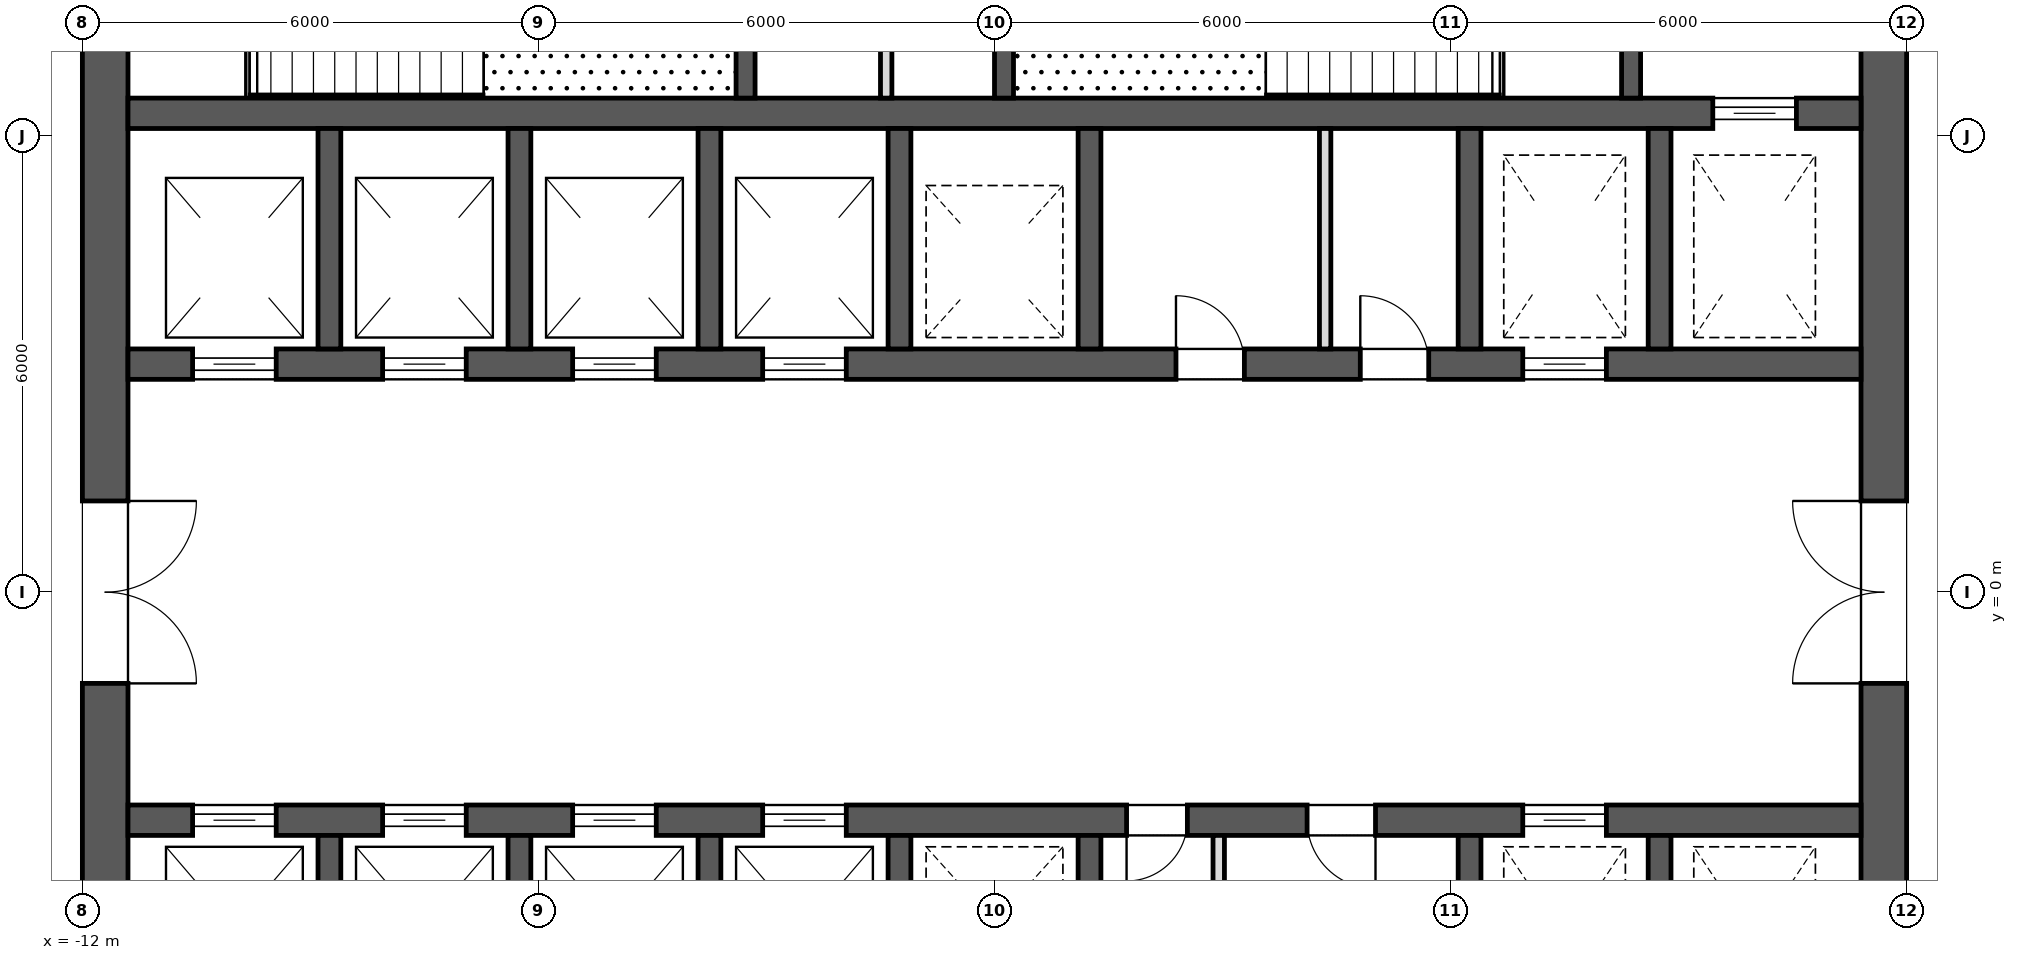
"""IFC4 building model, lengths in metres.
Left out: names, types, materials, properties, quantities, classifications, styles, units other than length and angle.
Written with IfcOpenShell. Run it as: python <this file> out.ifc"""

import sys

from ifc_helpers import new_model, si_unit, direction, frame, frame_2d, origin, place, context, subcontext, project, spatial, rectangle, extrude, element, fill, save


model = new_model("IFC4")
c1 = context("Model", 3, precision=1e-05, world=origin(), true_north=direction((0.0, 1.0)))
c2 = subcontext(c1, "Body", "Model", "MODEL_VIEW")
j1 = project(units=[si_unit("LENGTHUNIT", "METRE"), si_unit("PLANEANGLEUNIT", "RADIAN")], contexts=[c1])
p1 = place(None, origin())
s1 = spatial("IfcSite", under=j1, at=p1, CompositionType="ELEMENT")
p2 = place(p1, origin())
s2 = spatial("IfcBuilding", under=s1, at=p2, CompositionType="ELEMENT")
p3 = place(p2, frame((0.0, 0.0, 202.9)))
s3 = spatial("IfcBuildingStorey", under=s2, at=p3, CompositionType="ELEMENT", Elevation=202.9)
p4 = place(p3, frame((11.7, -11.4, 0.0), z_axis=(0.0, 0.0, 1.0), x_axis=(0.0, 1.0, 0.0)))
e1 = element("IfcWall", 1, at=p4, inside=s3, PredefinedType="SHEAR", context=c2, shape_type="SweptSolid", body=[
    extrude(rectangle(XDim=22.8, YDim=0.6, at=frame_2d((11.4, 0.0))), origin(), (0.0, 0.0, 1.0), 4.0),
])
p5 = place(p4, frame((10.2, 0.0, 0.0)))
e2 = element("IfcOpeningElement", 2, at=p5, cuts=e1, PredefinedType="OPENING", context=c2, shape_type="SweptSolid", body=[
    extrude(rectangle(XDim=2.4, YDim=2.1, at=frame_2d((1.2, 1.05))), frame((0.0, 0.312, 0.0), z_axis=(0.0, -1.0, 0.0), x_axis=(1.0, 0.0, 0.0)), (0.0, 0.0, 1.0), 0.624),
])
p6 = place(p4, frame((19.5, 0.0, 0.0)))
e3 = element("IfcOpeningElement", 3, at=p6, cuts=e1, PredefinedType="OPENING", context=c2, shape_type="SweptSolid", body=[
    extrude(rectangle(XDim=1.2, YDim=2.1, at=frame_2d((0.6, 1.05))), frame((0.0, 0.312, 0.0), z_axis=(0.0, -1.0, 0.0), x_axis=(1.0, 0.0, 0.0)), (0.0, 0.0, 1.0), 0.624),
])
p7 = place(p4, frame((2.1, 0.0, 0.0)))
e4 = element("IfcOpeningElement", 4, at=p7, cuts=e1, PredefinedType="OPENING", context=c2, shape_type="SweptSolid", body=[
    extrude(rectangle(XDim=1.2, YDim=2.1, at=frame_2d((0.6, 1.05))), frame((0.0, 0.312, 0.0), z_axis=(0.0, -1.0, 0.0), x_axis=(1.0, 0.0, 0.0)), (0.0, 0.0, 1.0), 0.624),
])
p8 = place(p3, frame((-11.7, -11.4, 0.0), z_axis=(0.0, 0.0, 1.0), x_axis=(0.0, 1.0, 0.0)))
e5 = element("IfcWall", 5, at=p8, inside=s3, PredefinedType="SHEAR", context=c2, shape_type="SweptSolid", body=[
    extrude(rectangle(XDim=22.8, YDim=0.6, at=frame_2d((11.4, 0.0))), origin(), (0.0, 0.0, 1.0), 4.0),
])
p9 = place(p8, frame((10.2, 0.0, 0.0)))
e6 = element("IfcOpeningElement", 6, at=p9, cuts=e5, PredefinedType="OPENING", context=c2, shape_type="SweptSolid", body=[
    extrude(rectangle(XDim=2.4, YDim=2.1, at=frame_2d((1.2, 1.05))), frame((0.0, 0.312, 0.0), z_axis=(0.0, -1.0, 0.0), x_axis=(1.0, 0.0, 0.0)), (0.0, 0.0, 1.0), 0.624),
])
p10 = place(p8, frame((18.925, 0.0, 0.0)))
e7 = element("IfcOpeningElement", 7, at=p10, cuts=e5, PredefinedType="OPENING", context=c2, shape_type="SweptSolid", body=[
    extrude(rectangle(XDim=1.2, YDim=2.1, at=frame_2d((0.6, 1.05))), frame((0.0, 0.312, 0.0), z_axis=(0.0, -1.0, 0.0), x_axis=(1.0, 0.0, 0.0)), (0.0, 0.0, 1.0), 0.624),
])
p11 = place(p8, frame((2.675, 0.0, 0.0)))
e8 = element("IfcOpeningElement", 8, at=p11, cuts=e5, PredefinedType="OPENING", context=c2, shape_type="SweptSolid", body=[
    extrude(rectangle(XDim=1.2, YDim=2.1, at=frame_2d((0.6, 1.05))), frame((0.0, 0.312, 0.0), z_axis=(0.0, -1.0, 0.0), x_axis=(1.0, 0.0, 0.0)), (0.0, 0.0, 1.0), 0.624),
])
p12 = place(p3, frame((-11.4, 3.0, 0.0), z_axis=(0.0, 0.0, 1.0), x_axis=(1.0, 0.0, 0.0)))
e9 = element("IfcWall", 9, at=p12, inside=s3, PredefinedType="SHEAR", context=c2, shape_type="SweptSolid", body=[
    extrude(rectangle(XDim=22.8, YDim=0.4, at=frame_2d((11.4, 0.0))), origin(), (0.0, 0.0, 1.0), 4.0),
])
p13 = place(p12, frame((0.85, 0.0, 0.0)))
e10 = element("IfcOpeningElement", 10, at=p13, cuts=e9, PredefinedType="OPENING", context=c2, shape_type="SweptSolid", body=[
    extrude(rectangle(XDim=1.1, YDim=2.1, at=frame_2d((0.55, 1.05))), frame((0.0, 0.212, 0.0), z_axis=(0.0, -1.0, 0.0), x_axis=(1.0, 0.0, 0.0)), (0.0, 0.0, 1.0), 0.424),
])
p14 = place(p12, frame((3.35, 0.0, 0.0)))
e11 = element("IfcOpeningElement", 11, at=p14, cuts=e9, PredefinedType="OPENING", context=c2, shape_type="SweptSolid", body=[
    extrude(rectangle(XDim=1.1, YDim=2.1, at=frame_2d((0.55, 1.05))), frame((0.0, 0.212, 0.0), z_axis=(0.0, -1.0, 0.0), x_axis=(1.0, 0.0, 0.0)), (0.0, 0.0, 1.0), 0.424),
])
p15 = place(p12, frame((5.85, 0.0, 0.0)))
e12 = element("IfcOpeningElement", 12, at=p15, cuts=e9, PredefinedType="OPENING", context=c2, shape_type="SweptSolid", body=[
    extrude(rectangle(XDim=1.1, YDim=2.1, at=frame_2d((0.55, 1.05))), frame((0.0, 0.212, 0.0), z_axis=(0.0, -1.0, 0.0), x_axis=(1.0, 0.0, 0.0)), (0.0, 0.0, 1.0), 0.424),
])
p16 = place(p12, frame((8.35, 0.0, 0.0)))
e13 = element("IfcOpeningElement", 13, at=p16, cuts=e9, PredefinedType="OPENING", context=c2, shape_type="SweptSolid", body=[
    extrude(rectangle(XDim=1.1, YDim=2.1, at=frame_2d((0.55, 1.05))), frame((0.0, 0.212, 0.0), z_axis=(0.0, -1.0, 0.0), x_axis=(1.0, 0.0, 0.0)), (0.0, 0.0, 1.0), 0.424),
])
p17 = place(p12, frame((18.35, 0.0, 0.0)))
e14 = element("IfcOpeningElement", 14, at=p17, cuts=e9, PredefinedType="OPENING", context=c2, shape_type="SweptSolid", body=[
    extrude(rectangle(XDim=1.1, YDim=2.1, at=frame_2d((0.55, 1.05))), frame((0.0, 0.212, 0.0), z_axis=(0.0, -1.0, 0.0), x_axis=(1.0, 0.0, 0.0)), (0.0, 0.0, 1.0), 0.424),
])
p18 = place(p12, frame((13.788, 0.0, 0.0)))
e15 = element("IfcOpeningElement", 15, at=p18, cuts=e9, PredefinedType="OPENING", context=c2, shape_type="SweptSolid", body=[
    extrude(rectangle(XDim=0.9, YDim=2.1, at=frame_2d((0.45, 1.05))), frame((0.0, 0.212, 0.0), z_axis=(0.0, -1.0, 0.0), x_axis=(1.0, 0.0, 0.0)), (0.0, 0.0, 1.0), 0.424),
])
p19 = place(p12, frame((16.212, 0.0, 0.0)))
e16 = element("IfcOpeningElement", 16, at=p19, cuts=e9, PredefinedType="OPENING", context=c2, shape_type="SweptSolid", body=[
    extrude(rectangle(XDim=0.9, YDim=2.1, at=frame_2d((0.45, 1.05))), frame((0.0, 0.212, 0.0), z_axis=(0.0, -1.0, 0.0), x_axis=(1.0, 0.0, 0.0)), (0.0, 0.0, 1.0), 0.424),
])
p20 = place(p3, frame((-11.4, 6.3, 0.0), z_axis=(0.0, 0.0, 1.0), x_axis=(1.0, 0.0, 0.0)))
e17 = element("IfcWall", 17, at=p20, inside=s3, PredefinedType="SHEAR", context=c2, shape_type="SweptSolid", body=[
    extrude(rectangle(XDim=22.8, YDim=0.4, at=frame_2d((11.4, 0.0))), origin(), (0.0, 0.0, 1.0), 4.0),
])
p21 = place(p20, frame((20.85, 0.0, 0.0)))
e18 = element("IfcOpeningElement", 18, at=p21, cuts=e17, PredefinedType="OPENING", context=c2, shape_type="SweptSolid", body=[
    extrude(rectangle(XDim=1.1, YDim=2.1, at=frame_2d((0.55, 1.05))), frame((0.0, 0.212, 0.0), z_axis=(0.0, -1.0, 0.0), x_axis=(1.0, 0.0, 0.0)), (0.0, 0.0, 1.0), 0.424),
])
for number, where, z_axis, x_axis in (
    (19, (-8.75, 3.2, 0.0), (0.0, 0.0, 1.0), (0.0, 1.0, 0.0)),
    (20, (-6.25, 3.2, 0.0), (0.0, 0.0, 1.0), (0.0, 1.0, 0.0)),
    (21, (-3.75, 3.2, 0.0), (0.0, 0.0, 1.0), (0.0, 1.0, 0.0)),
    (22, (-1.25, 3.2, 0.0), (0.0, 0.0, 1.0), (0.0, 1.0, 0.0)),
    (23, (1.25, 3.2, 0.0), (0.0, 0.0, 1.0), (0.0, 1.0, 0.0)),
    (24, (6.25, 3.2, 0.0), (0.0, 0.0, 1.0), (0.0, 1.0, 0.0)),
    (25, (8.75, 3.2, 0.0), (0.0, 0.0, 1.0), (0.0, 1.0, 0.0)),
):
    element("IfcWall", number, at=place(p3, frame(where, z_axis=z_axis, x_axis=x_axis)), inside=s3, PredefinedType="SHEAR", context=c2, shape_type="SweptSolid", body=[
        extrude(rectangle(XDim=2.9, YDim=0.3, at=frame_2d((1.45, 0.0))), origin(), (0.0, 0.0, 1.0), 4.0),
    ])
p22 = place(p3, frame((-11.4, -3.0, 0.0), z_axis=(0.0, 0.0, 1.0), x_axis=(1.0, 0.0, 0.0)))
e26 = element("IfcWall", 26, at=p22, inside=s3, PredefinedType="SHEAR", context=c2, shape_type="SweptSolid", body=[
    extrude(rectangle(XDim=22.8, YDim=0.4, at=frame_2d((11.4, 0.0))), origin(), (0.0, 0.0, 1.0), 4.0),
])
p23 = place(p22, frame((0.85, 0.0, 0.0)))
e27 = element("IfcOpeningElement", 27, at=p23, cuts=e26, PredefinedType="OPENING", context=c2, shape_type="SweptSolid", body=[
    extrude(rectangle(XDim=1.1, YDim=2.1, at=frame_2d((0.55, 1.05))), frame((0.0, 0.212, 0.0), z_axis=(0.0, -1.0, 0.0), x_axis=(1.0, 0.0, 0.0)), (0.0, 0.0, 1.0), 0.424),
])
p24 = place(p22, frame((3.35, 0.0, 0.0)))
e28 = element("IfcOpeningElement", 28, at=p24, cuts=e26, PredefinedType="OPENING", context=c2, shape_type="SweptSolid", body=[
    extrude(rectangle(XDim=1.1, YDim=2.1, at=frame_2d((0.55, 1.05))), frame((0.0, 0.212, 0.0), z_axis=(0.0, -1.0, 0.0), x_axis=(1.0, 0.0, 0.0)), (0.0, 0.0, 1.0), 0.424),
])
p25 = place(p22, frame((5.85, 0.0, 0.0)))
e29 = element("IfcOpeningElement", 29, at=p25, cuts=e26, PredefinedType="OPENING", context=c2, shape_type="SweptSolid", body=[
    extrude(rectangle(XDim=1.1, YDim=2.1, at=frame_2d((0.55, 1.05))), frame((0.0, 0.212, 0.0), z_axis=(0.0, -1.0, 0.0), x_axis=(1.0, 0.0, 0.0)), (0.0, 0.0, 1.0), 0.424),
])
p26 = place(p22, frame((8.35, 0.0, 0.0)))
e30 = element("IfcOpeningElement", 30, at=p26, cuts=e26, PredefinedType="OPENING", context=c2, shape_type="SweptSolid", body=[
    extrude(rectangle(XDim=1.1, YDim=2.1, at=frame_2d((0.55, 1.05))), frame((0.0, 0.212, 0.0), z_axis=(0.0, -1.0, 0.0), x_axis=(1.0, 0.0, 0.0)), (0.0, 0.0, 1.0), 0.424),
])
p27 = place(p22, frame((18.35, 0.0, 0.0)))
e31 = element("IfcOpeningElement", 31, at=p27, cuts=e26, PredefinedType="OPENING", context=c2, shape_type="SweptSolid", body=[
    extrude(rectangle(XDim=1.1, YDim=2.1, at=frame_2d((0.55, 1.05))), frame((0.0, 0.212, 0.0), z_axis=(0.0, -1.0, 0.0), x_axis=(1.0, 0.0, 0.0)), (0.0, 0.0, 1.0), 0.424),
])
p28 = place(p22, frame((13.137, 0.0, 0.0)))
e32 = element("IfcOpeningElement", 32, at=p28, cuts=e26, PredefinedType="OPENING", context=c2, shape_type="SweptSolid", body=[
    extrude(rectangle(XDim=0.8, YDim=2.1, at=frame_2d((0.4, 1.05))), frame((0.0, 0.212, 0.0), z_axis=(0.0, -1.0, 0.0), x_axis=(1.0, 0.0, 0.0)), (0.0, 0.0, 1.0), 0.424),
])
p29 = place(p22, frame((15.512, 0.0, 0.0)))
e33 = element("IfcOpeningElement", 33, at=p29, cuts=e26, PredefinedType="OPENING", context=c2, shape_type="SweptSolid", body=[
    extrude(rectangle(XDim=0.9, YDim=2.1, at=frame_2d((0.45, 1.05))), frame((0.0, 0.212, 0.0), z_axis=(0.0, -1.0, 0.0), x_axis=(1.0, 0.0, 0.0)), (0.0, 0.0, 1.0), 0.424),
])
for number, where, z_axis, x_axis in (
    (34, (-8.75, -6.1, 0.0), (0.0, 0.0, 1.0), (0.0, 1.0, 0.0)),
    (35, (-6.25, -6.1, 0.0), (0.0, 0.0, 1.0), (0.0, 1.0, 0.0)),
    (36, (-3.75, -6.1, 0.0), (0.0, 0.0, 1.0), (0.0, 1.0, 0.0)),
    (37, (-1.25, -6.1, 0.0), (0.0, 0.0, 1.0), (0.0, 1.0, 0.0)),
    (38, (1.25, -6.1, 0.0), (0.0, 0.0, 1.0), (0.0, 1.0, 0.0)),
    (39, (6.25, -6.1, 0.0), (0.0, 0.0, 1.0), (0.0, 1.0, 0.0)),
    (40, (8.75, -6.1, 0.0), (0.0, 0.0, 1.0), (0.0, 1.0, 0.0)),
):
    element("IfcWall", number, at=place(p3, frame(where, z_axis=z_axis, x_axis=x_axis)), inside=s3, PredefinedType="SHEAR", context=c2, shape_type="SweptSolid", body=[
        extrude(rectangle(XDim=2.9, YDim=0.3, at=frame_2d((1.45, 0.0))), origin(), (0.0, 0.0, 1.0), 4.0),
    ])
for number, where, z_axis, x_axis in (
    (41, (-3.275, 6.5, 0.0), (0.0, 0.0, 1.0), (0.0, 1.0, 0.0)),
    (42, (0.125, 6.5, 0.0), (0.0, 0.0, 1.0), (0.0, 1.0, 0.0)),
):
    element("IfcWall", number, at=place(p3, frame(where, z_axis=z_axis, x_axis=x_axis)), inside=s3, PredefinedType="SHEAR", context=c2, shape_type="SweptSolid", body=[
        extrude(rectangle(XDim=4.9, YDim=0.25, at=frame_2d((2.45, 0.0))), origin(), (0.0, 0.0, 1.0), 3.7),
    ])
p30 = place(p3, frame((8.375, 6.5, 0.0), z_axis=(0.0, 0.0, 1.0), x_axis=(0.0, 1.0, 0.0)))
e43 = element("IfcWall", 43, at=p30, inside=s3, PredefinedType="SHEAR", context=c2, shape_type="SweptSolid", body=[
    extrude(rectangle(XDim=3.4, YDim=0.25, at=frame_2d((1.7, 0.0))), origin(), (0.0, 0.0, 1.0), 3.7),
])
p31 = place(p30, frame((1.025, 0.0, 0.0)))
e44 = element("IfcOpeningElement", 44, at=p31, cuts=e43, PredefinedType="OPENING", context=c2, shape_type="SweptSolid", body=[
    extrude(rectangle(XDim=1.2, YDim=2.1, at=frame_2d((0.6, 1.05))), frame((0.0, 0.137, 0.0), z_axis=(0.0, -1.0, 0.0), x_axis=(1.0, 0.0, 0.0)), (0.0, 0.0, 1.0), 0.274),
])
p32 = place(p3, frame((-1.425, 6.5, 0.0), z_axis=(0.0, 0.0, 1.0), x_axis=(0.0, 1.0, 0.0)))
e45 = element("IfcWall", 45, at=p32, inside=s3, PredefinedType="PARTITIONING", context=c2, shape_type="SweptSolid", body=[
    extrude(rectangle(XDim=4.9, YDim=0.15, at=frame_2d((2.45, 0.0))), origin(), (0.0, 0.0, 1.0), 3.7),
])
for number, where, z_axis, x_axis in (
    (46, (4.35, 3.2, 0.0), (0.0, 0.0, 1.0), (0.0, 1.0, 0.0)),
    (47, (2.95, -6.1, 0.0), (0.0, 0.0, 1.0), (0.0, 1.0, 0.0)),
):
    element("IfcWall", number, at=place(p3, frame(where, z_axis=z_axis, x_axis=x_axis)), inside=s3, PredefinedType="PARTITIONING", context=c2, shape_type="SweptSolid", body=[
        extrude(rectangle(XDim=2.9, YDim=0.15, at=frame_2d((1.45, 0.0))), origin(), (0.0, 0.0, 1.0), 3.7),
    ])
p33 = place(p21, origin())
e48 = element("IfcDoor", 48, at=p33, inside=s3, OperationType="SLIDING_TO_LEFT", PredefinedType="DOOR", context=c2, shape_type="SweptSolid", body=[
    extrude(rectangle(XDim=1.1, YDim=2.1, at=frame_2d((0.55, 1.05))), frame((0.0, 0.025, 0.0), z_axis=(0.0, -1.0, 0.0), x_axis=(1.0, 0.0, 0.0)), (0.0, 0.0, 1.0), 0.05),
])
fill(e18, e48)
p34 = place(p13, origin())
e49 = element("IfcDoor", 49, at=p34, inside=s3, OperationType="SLIDING_TO_LEFT", PredefinedType="DOOR", context=c2, shape_type="SweptSolid", body=[
    extrude(rectangle(XDim=1.1, YDim=2.1, at=frame_2d((0.55, 1.05))), frame((0.0, 0.025, 0.0), z_axis=(0.0, -1.0, 0.0), x_axis=(1.0, 0.0, 0.0)), (0.0, 0.0, 1.0), 0.05),
])
fill(e10, e49)
p35 = place(p14, origin())
e50 = element("IfcDoor", 50, at=p35, inside=s3, OperationType="SLIDING_TO_LEFT", PredefinedType="DOOR", context=c2, shape_type="SweptSolid", body=[
    extrude(rectangle(XDim=1.1, YDim=2.1, at=frame_2d((0.55, 1.05))), frame((0.0, 0.025, 0.0), z_axis=(0.0, -1.0, 0.0), x_axis=(1.0, 0.0, 0.0)), (0.0, 0.0, 1.0), 0.05),
])
fill(e11, e50)
p36 = place(p23, origin())
e51 = element("IfcDoor", 51, at=p36, inside=s3, OperationType="SLIDING_TO_LEFT", PredefinedType="DOOR", context=c2, shape_type="SweptSolid", body=[
    extrude(rectangle(XDim=1.1, YDim=2.1, at=frame_2d((0.55, 1.05))), frame((0.0, 0.025, 0.0), z_axis=(0.0, -1.0, 0.0), x_axis=(1.0, 0.0, 0.0)), (0.0, 0.0, 1.0), 0.05),
])
fill(e27, e51)
p37 = place(p24, origin())
e52 = element("IfcDoor", 52, at=p37, inside=s3, OperationType="SLIDING_TO_LEFT", PredefinedType="DOOR", context=c2, shape_type="SweptSolid", body=[
    extrude(rectangle(XDim=1.1, YDim=2.1, at=frame_2d((0.55, 1.05))), frame((0.0, 0.025, 0.0), z_axis=(0.0, -1.0, 0.0), x_axis=(1.0, 0.0, 0.0)), (0.0, 0.0, 1.0), 0.05),
])
fill(e28, e52)
p38 = place(p15, origin())
e53 = element("IfcDoor", 53, at=p38, inside=s3, OperationType="SLIDING_TO_LEFT", PredefinedType="DOOR", context=c2, shape_type="SweptSolid", body=[
    extrude(rectangle(XDim=1.1, YDim=2.1, at=frame_2d((0.55, 1.05))), frame((0.0, 0.025, 0.0), z_axis=(0.0, -1.0, 0.0), x_axis=(1.0, 0.0, 0.0)), (0.0, 0.0, 1.0), 0.05),
])
fill(e12, e53)
p39 = place(p16, origin())
e54 = element("IfcDoor", 54, at=p39, inside=s3, OperationType="SLIDING_TO_LEFT", PredefinedType="DOOR", context=c2, shape_type="SweptSolid", body=[
    extrude(rectangle(XDim=1.1, YDim=2.1, at=frame_2d((0.55, 1.05))), frame((0.0, 0.025, 0.0), z_axis=(0.0, -1.0, 0.0), x_axis=(1.0, 0.0, 0.0)), (0.0, 0.0, 1.0), 0.05),
])
fill(e13, e54)
p40 = place(p25, origin())
e55 = element("IfcDoor", 55, at=p40, inside=s3, OperationType="SLIDING_TO_LEFT", PredefinedType="DOOR", context=c2, shape_type="SweptSolid", body=[
    extrude(rectangle(XDim=1.1, YDim=2.1, at=frame_2d((0.55, 1.05))), frame((0.0, 0.025, 0.0), z_axis=(0.0, -1.0, 0.0), x_axis=(1.0, 0.0, 0.0)), (0.0, 0.0, 1.0), 0.05),
])
fill(e29, e55)
p41 = place(p26, origin())
e56 = element("IfcDoor", 56, at=p41, inside=s3, OperationType="SLIDING_TO_LEFT", PredefinedType="DOOR", context=c2, shape_type="SweptSolid", body=[
    extrude(rectangle(XDim=1.1, YDim=2.1, at=frame_2d((0.55, 1.05))), frame((0.0, 0.025, 0.0), z_axis=(0.0, -1.0, 0.0), x_axis=(1.0, 0.0, 0.0)), (0.0, 0.0, 1.0), 0.05),
])
fill(e30, e56)
p42 = place(p17, origin())
e57 = element("IfcDoor", 57, at=p42, inside=s3, OperationType="SLIDING_TO_LEFT", PredefinedType="DOOR", context=c2, shape_type="SweptSolid", body=[
    extrude(rectangle(XDim=1.1, YDim=2.1, at=frame_2d((0.55, 1.05))), frame((0.0, 0.025, 0.0), z_axis=(0.0, -1.0, 0.0), x_axis=(1.0, 0.0, 0.0)), (0.0, 0.0, 1.0), 0.05),
])
fill(e14, e57)
p43 = place(p27, origin())
e58 = element("IfcDoor", 58, at=p43, inside=s3, OperationType="SLIDING_TO_LEFT", PredefinedType="DOOR", context=c2, shape_type="SweptSolid", body=[
    extrude(rectangle(XDim=1.1, YDim=2.1, at=frame_2d((0.55, 1.05))), frame((0.0, 0.025, 0.0), z_axis=(0.0, -1.0, 0.0), x_axis=(1.0, 0.0, 0.0)), (0.0, 0.0, 1.0), 0.05),
])
fill(e31, e58)
p44 = place(p9, frame((2.4, 0.0, 0.0), z_axis=(0.0, 0.0, 1.0), x_axis=(-1.0, 0.0, 0.0)))
e59 = element("IfcDoor", 59, at=p44, inside=s3, OperationType="DOUBLE_DOOR_SINGLE_SWING", PredefinedType="DOOR", context=c2, shape_type="SweptSolid", body=[
    extrude(rectangle(XDim=2.4, YDim=2.1, at=frame_2d((1.2, 1.05))), frame((0.0, 0.025, 0.0), z_axis=(0.0, -1.0, 0.0), x_axis=(1.0, 0.0, 0.0)), (0.0, 0.0, 1.0), 0.05),
])
fill(e6, e59)
p45 = place(p5, origin())
e60 = element("IfcDoor", 60, at=p45, inside=s3, OperationType="DOUBLE_DOOR_SINGLE_SWING", PredefinedType="DOOR", context=c2, shape_type="SweptSolid", body=[
    extrude(rectangle(XDim=2.4, YDim=2.1, at=frame_2d((1.2, 1.05))), frame((0.0, 0.025, 0.0), z_axis=(0.0, -1.0, 0.0), x_axis=(1.0, 0.0, 0.0)), (0.0, 0.0, 1.0), 0.05),
])
fill(e2, e60)
p46 = place(p18, origin())
e61 = element("IfcDoor", 61, at=p46, inside=s3, OperationType="SINGLE_SWING_RIGHT", PredefinedType="DOOR", context=c2, shape_type="SweptSolid", body=[
    extrude(rectangle(XDim=0.9, YDim=2.1, at=frame_2d((0.45, 1.05))), frame((0.0, 0.025, 0.0), z_axis=(0.0, -1.0, 0.0), x_axis=(1.0, 0.0, 0.0)), (0.0, 0.0, 1.0), 0.05),
])
fill(e15, e61)
p47 = place(p19, origin())
e62 = element("IfcDoor", 62, at=p47, inside=s3, OperationType="SINGLE_SWING_RIGHT", PredefinedType="DOOR", context=c2, shape_type="SweptSolid", body=[
    extrude(rectangle(XDim=0.9, YDim=2.1, at=frame_2d((0.45, 1.05))), frame((0.0, 0.025, 0.0), z_axis=(0.0, -1.0, 0.0), x_axis=(1.0, 0.0, 0.0)), (0.0, 0.0, 1.0), 0.05),
])
fill(e16, e62)
p48 = place(p28, frame((0.8, 0.0, 0.0), z_axis=(0.0, 0.0, 1.0), x_axis=(-1.0, 0.0, 0.0)))
e63 = element("IfcDoor", 63, at=p48, inside=s3, OperationType="SINGLE_SWING_LEFT", PredefinedType="DOOR", context=c2, shape_type="SweptSolid", body=[
    extrude(rectangle(XDim=0.8, YDim=2.1, at=frame_2d((0.4, 1.05))), frame((0.0, 0.025, 0.0), z_axis=(0.0, -1.0, 0.0), x_axis=(1.0, 0.0, 0.0)), (0.0, 0.0, 1.0), 0.05),
])
fill(e32, e63)
p49 = place(p29, frame((0.9, 0.0, 0.0), z_axis=(0.0, 0.0, 1.0), x_axis=(-1.0, 0.0, 0.0)))
e64 = element("IfcDoor", 64, at=p49, inside=s3, OperationType="SINGLE_SWING_RIGHT", PredefinedType="DOOR", context=c2, shape_type="SweptSolid", body=[
    extrude(rectangle(XDim=0.9, YDim=2.1, at=frame_2d((0.45, 1.05))), frame((0.0, 0.025, 0.0), z_axis=(0.0, -1.0, 0.0), x_axis=(1.0, 0.0, 0.0)), (0.0, 0.0, 1.0), 0.05),
])
fill(e33, e64)
save(model, sys.argv[1])
